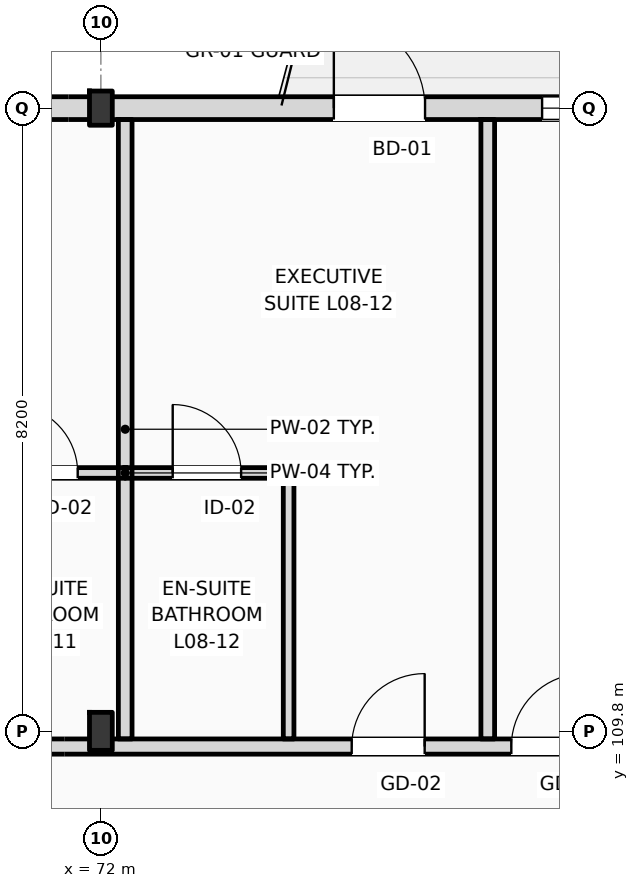
"""IFC4 building model, lengths in metres.
Left out: names, types, materials, properties, quantities, classifications, styles, units other than length and angle.
Written with IfcOpenShell. Run it as: python <this file> out.ifc"""

import sys

from ifc_helpers import new_model, si_unit, direction, frame, frame_2d, origin, origin_2d, place, context, subcontext, project, spatial, rectangle, i_section, extrude, element, fill, save


model = new_model("IFC4")
c1 = context("Model", 3, precision=1e-05, world=origin(), true_north=direction((0.0, 1.0)))
c2 = subcontext(c1, "Body", "Model", "MODEL_VIEW")
j1 = project(units=[si_unit("LENGTHUNIT", "METRE"), si_unit("PLANEANGLEUNIT", "RADIAN")], contexts=[c1])
p1 = place(None, origin())
s1 = spatial("IfcSite", under=j1, at=p1, CompositionType="ELEMENT")
p2 = place(p1, origin())
s2 = spatial("IfcBuilding", under=s1, at=p2, CompositionType="ELEMENT")
p3 = place(p2, frame((0.0, 0.0, 35.4)))
s3 = spatial("IfcBuildingStorey", under=s2, at=p3, CompositionType="ELEMENT", Elevation=35.4)
p4 = place(p3, frame((72.0, 109.8, 0.0), z_axis=(0.0, 0.0, 1.0), x_axis=(1.0, 0.0, 0.0)))
e1 = element("IfcColumn", 1, at=p4, inside=s3, PredefinedType="COLUMN", context=c2, shape_type="SweptSolid", body=[
    extrude(i_section(OverallWidth=0.3, OverallDepth=0.5, WebThickness=0.014, FlangeThickness=0.028, FilletRadius=0.027, at=origin_2d()), origin(), (0.0, 0.0, 1.0), 3.6),
])
p5 = place(p3, frame((72.0, 118.0, 0.0), z_axis=(0.0, 0.0, 1.0), x_axis=(1.0, 0.0, 0.0)))
e2 = element("IfcColumn", 2, at=p5, inside=s3, PredefinedType="COLUMN", context=c2, shape_type="SweptSolid", body=[
    extrude(i_section(OverallWidth=0.3, OverallDepth=0.45, WebThickness=0.014, FlangeThickness=0.026, FilletRadius=0.027, at=origin_2d()), origin(), (0.0, 0.0, 1.0), 3.6),
])
p6 = place(p3, frame((22.5, 118.0, 0.0), z_axis=(0.0, 0.0, 1.0), x_axis=(1.0, 0.0, 0.0)))
e3 = element("IfcWall", 3, at=p6, inside=s3, PredefinedType="STANDARD", context=c2, shape_type="SweptSolid", body=[
    extrude(rectangle(XDim=72.9, YDim=0.3, at=frame_2d((36.45, 0.0))), origin(), (0.0, 0.0, 1.0), 2.92),
])
p7 = place(p6, frame((0.91, 0.0, 0.9)))
e4 = element("IfcOpeningElement", 4, at=p7, cuts=e3, PredefinedType="OPENING", context=c2, shape_type="SweptSolid", body=[
    extrude(rectangle(XDim=0.9, YDim=1.84, at=frame_2d((0.45, 0.92))), frame((0.0, 0.16, 0.0), z_axis=(0.0, -1.0, 0.0), x_axis=(1.0, 0.0, 0.0)), (0.0, 0.0, 1.0), 0.32),
])
p8 = place(p6, frame((6.665, 0.0, 0.0)))
e5 = element("IfcOpeningElement", 5, at=p8, cuts=e3, PredefinedType="OPENING", context=c2, shape_type="SweptSolid", body=[
    extrude(rectangle(XDim=1.2, YDim=2.25, at=frame_2d((0.6, 1.125))), frame((0.0, 0.16, 0.0), z_axis=(0.0, -1.0, 0.0), x_axis=(1.0, 0.0, 0.0)), (0.0, 0.0, 1.0), 0.32),
])
p9 = place(p6, frame((11.355, 0.0, 0.9)))
e6 = element("IfcOpeningElement", 6, at=p9, cuts=e3, PredefinedType="OPENING", context=c2, shape_type="SweptSolid", body=[
    extrude(rectangle(XDim=1.1, YDim=1.5, at=frame_2d((0.55, 0.75))), frame((0.0, 0.16, 0.0), z_axis=(0.0, -1.0, 0.0), x_axis=(1.0, 0.0, 0.0)), (0.0, 0.0, 1.0), 0.32),
])
p10 = place(p6, frame((15.58, 0.0, 0.9)))
e7 = element("IfcOpeningElement", 7, at=p10, cuts=e3, PredefinedType="OPENING", context=c2, shape_type="SweptSolid", body=[
    extrude(rectangle(XDim=1.25, YDim=1.6, at=frame_2d((0.625, 0.8))), frame((0.0, 0.16, 0.0), z_axis=(0.0, -1.0, 0.0), x_axis=(1.0, 0.0, 0.0)), (0.0, 0.0, 1.0), 0.32),
])
p11 = place(p6, frame((21.08, 0.0, 0.0)))
e8 = element("IfcOpeningElement", 8, at=p11, cuts=e3, PredefinedType="OPENING", context=c2, shape_type="SweptSolid", body=[
    extrude(rectangle(XDim=1.2, YDim=2.25, at=frame_2d((0.6, 1.125))), frame((0.0, 0.16, 0.0), z_axis=(0.0, -1.0, 0.0), x_axis=(1.0, 0.0, 0.0)), (0.0, 0.0, 1.0), 0.32),
])
p12 = place(p6, frame((23.54, 0.0, 0.0)))
e9 = element("IfcOpeningElement", 9, at=p12, cuts=e3, PredefinedType="OPENING", context=c2, shape_type="SweptSolid", body=[
    extrude(rectangle(XDim=1.2, YDim=2.25, at=frame_2d((0.6, 1.125))), frame((0.0, 0.16, 0.0), z_axis=(0.0, -1.0, 0.0), x_axis=(1.0, 0.0, 0.0)), (0.0, 0.0, 1.0), 0.32),
])
p13 = place(p6, frame((28.83, 0.0, 0.9)))
e10 = element("IfcOpeningElement", 10, at=p13, cuts=e3, PredefinedType="OPENING", context=c2, shape_type="SweptSolid", body=[
    extrude(rectangle(XDim=1.75, YDim=1.84, at=frame_2d((0.875, 0.92))), frame((0.0, 0.16, 0.0), z_axis=(0.0, -1.0, 0.0), x_axis=(1.0, 0.0, 0.0)), (0.0, 0.0, 1.0), 0.32),
])
p14 = place(p6, frame((34.805, 0.0, 0.9)))
e11 = element("IfcOpeningElement", 11, at=p14, cuts=e3, PredefinedType="OPENING", context=c2, shape_type="SweptSolid", body=[
    extrude(rectangle(XDim=1.35, YDim=1.84, at=frame_2d((0.675, 0.92))), frame((0.0, 0.16, 0.0), z_axis=(0.0, -1.0, 0.0), x_axis=(1.0, 0.0, 0.0)), (0.0, 0.0, 1.0), 0.32),
])
p15 = place(p6, frame((38.105, 0.0, 0.0)))
e12 = element("IfcOpeningElement", 12, at=p15, cuts=e3, PredefinedType="OPENING", context=c2, shape_type="SweptSolid", body=[
    extrude(rectangle(XDim=1.2, YDim=2.25, at=frame_2d((0.6, 1.125))), frame((0.0, 0.16, 0.0), z_axis=(0.0, -1.0, 0.0), x_axis=(1.0, 0.0, 0.0)), (0.0, 0.0, 1.0), 0.32),
])
p16 = place(p6, frame((42.505, 0.0, 0.9)))
e13 = element("IfcOpeningElement", 13, at=p16, cuts=e3, PredefinedType="OPENING", context=c2, shape_type="SweptSolid", body=[
    extrude(rectangle(XDim=2.6, YDim=1.84, at=frame_2d((1.3, 0.92))), frame((0.0, 0.16, 0.0), z_axis=(0.0, -1.0, 0.0), x_axis=(1.0, 0.0, 0.0)), (0.0, 0.0, 1.0), 0.32),
])
p17 = place(p6, frame((46.2, 0.0, 0.9)))
e14 = element("IfcOpeningElement", 14, at=p17, cuts=e3, PredefinedType="OPENING", context=c2, shape_type="SweptSolid", body=[
    extrude(rectangle(XDim=1.8, YDim=1.84, at=frame_2d((0.9, 0.92))), frame((0.0, 0.16, 0.0), z_axis=(0.0, -1.0, 0.0), x_axis=(1.0, 0.0, 0.0)), (0.0, 0.0, 1.0), 0.32),
])
p18 = place(p6, frame((52.565, 0.0, 0.0)))
e15 = element("IfcOpeningElement", 15, at=p18, cuts=e3, PredefinedType="OPENING", context=c2, shape_type="SweptSolid", body=[
    extrude(rectangle(XDim=1.2, YDim=2.25, at=frame_2d((0.6, 1.125))), frame((0.0, 0.16, 0.0), z_axis=(0.0, -1.0, 0.0), x_axis=(1.0, 0.0, 0.0)), (0.0, 0.0, 1.0), 0.32),
])
p19 = place(p6, frame((55.305, 0.0, 0.9)))
e16 = element("IfcOpeningElement", 16, at=p19, cuts=e3, PredefinedType="OPENING", context=c2, shape_type="SweptSolid", body=[
    extrude(rectangle(XDim=1.2, YDim=1.8, at=frame_2d((0.6, 0.9))), frame((0.0, 0.16, 0.0), z_axis=(0.0, -1.0, 0.0), x_axis=(1.0, 0.0, 0.0)), (0.0, 0.0, 1.0), 0.32),
])
p20 = place(p6, frame((60.53, 0.0, 0.9)))
e17 = element("IfcOpeningElement", 17, at=p20, cuts=e3, PredefinedType="OPENING", context=c2, shape_type="SweptSolid", body=[
    extrude(rectangle(XDim=1.35, YDim=1.84, at=frame_2d((0.675, 0.92))), frame((0.0, 0.16, 0.0), z_axis=(0.0, -1.0, 0.0), x_axis=(1.0, 0.0, 0.0)), (0.0, 0.0, 1.0), 0.32),
])
p21 = place(p6, frame((65.955, 0.0, 0.9)))
e18 = element("IfcOpeningElement", 18, at=p21, cuts=e3, PredefinedType="OPENING", context=c2, shape_type="SweptSolid", body=[
    extrude(rectangle(XDim=1.35, YDim=1.84, at=frame_2d((0.675, 0.92))), frame((0.0, 0.16, 0.0), z_axis=(0.0, -1.0, 0.0), x_axis=(1.0, 0.0, 0.0)), (0.0, 0.0, 1.0), 0.32),
])
p22 = place(p6, frame((69.335, 0.0, 0.9)))
e19 = element("IfcOpeningElement", 19, at=p22, cuts=e3, PredefinedType="OPENING", context=c2, shape_type="SweptSolid", body=[
    extrude(rectangle(XDim=1.65, YDim=1.84, at=frame_2d((0.825, 0.92))), frame((0.0, 0.16, 0.0), z_axis=(0.0, -1.0, 0.0), x_axis=(1.0, 0.0, 0.0)), (0.0, 0.0, 1.0), 0.32),
])
p23 = place(p3, frame((10.65, 109.6, 0.0), z_axis=(0.0, 0.0, 1.0), x_axis=(1.0, 0.0, 0.0)))
e20 = element("IfcWall", 20, at=p23, inside=s3, PredefinedType="PARTITIONING", context=c2, shape_type="SweptSolid", body=[
    extrude(rectangle(XDim=84.61, YDim=0.2, at=frame_2d((42.305, 0.0))), origin(), (0.0, 0.0, 1.0), 2.82),
])
p24 = place(p23, frame((12.675, 0.0, 0.0)))
e21 = element("IfcOpeningElement", 21, at=p24, cuts=e20, PredefinedType="OPENING", context=c2, shape_type="SweptSolid", body=[
    extrude(rectangle(XDim=1.02, YDim=2.2, at=frame_2d((0.51, 1.1))), frame((0.0, 0.11, 0.0), z_axis=(0.0, -1.0, 0.0), x_axis=(1.0, 0.0, 0.0)), (0.0, 0.0, 1.0), 0.22),
])
p25 = place(p23, frame((19.62, 0.0, 0.0)))
e22 = element("IfcOpeningElement", 22, at=p25, cuts=e20, PredefinedType="OPENING", context=c2, shape_type="SweptSolid", body=[
    extrude(rectangle(XDim=1.02, YDim=2.2, at=frame_2d((0.51, 1.1))), frame((0.0, 0.11, 0.0), z_axis=(0.0, -1.0, 0.0), x_axis=(1.0, 0.0, 0.0)), (0.0, 0.0, 1.0), 0.22),
])
p26 = place(p23, frame((24.12, 0.0, 0.0)))
e23 = element("IfcOpeningElement", 23, at=p26, cuts=e20, PredefinedType="OPENING", context=c2, shape_type="SweptSolid", body=[
    extrude(rectangle(XDim=1.02, YDim=2.2, at=frame_2d((0.51, 1.1))), frame((0.0, 0.11, 0.0), z_axis=(0.0, -1.0, 0.0), x_axis=(1.0, 0.0, 0.0)), (0.0, 0.0, 1.0), 0.22),
])
p27 = place(p23, frame((26.47, 0.0, 0.0)))
e24 = element("IfcOpeningElement", 24, at=p27, cuts=e20, PredefinedType="OPENING", context=c2, shape_type="SweptSolid", body=[
    extrude(rectangle(XDim=1.02, YDim=2.2, at=frame_2d((0.51, 1.1))), frame((0.0, 0.11, 0.0), z_axis=(0.0, -1.0, 0.0), x_axis=(1.0, 0.0, 0.0)), (0.0, 0.0, 1.0), 0.22),
])
p28 = place(p23, frame((33.15, 0.0, 0.0)))
e25 = element("IfcOpeningElement", 25, at=p28, cuts=e20, PredefinedType="OPENING", context=c2, shape_type="SweptSolid", body=[
    extrude(rectangle(XDim=0.96, YDim=2.2, at=frame_2d((0.48, 1.1))), frame((0.0, 0.11, 0.0), z_axis=(0.0, -1.0, 0.0), x_axis=(1.0, 0.0, 0.0)), (0.0, 0.0, 1.0), 0.22),
])
p29 = place(p23, frame((35.5, 0.0, 0.0)))
e26 = element("IfcOpeningElement", 26, at=p29, cuts=e20, PredefinedType="OPENING", context=c2, shape_type="SweptSolid", body=[
    extrude(rectangle(XDim=0.96, YDim=2.2, at=frame_2d((0.48, 1.1))), frame((0.0, 0.11, 0.0), z_axis=(0.0, -1.0, 0.0), x_axis=(1.0, 0.0, 0.0)), (0.0, 0.0, 1.0), 0.22),
])
p30 = place(p23, frame((42.15, 0.0, 0.0)))
e27 = element("IfcOpeningElement", 27, at=p30, cuts=e20, PredefinedType="OPENING", context=c2, shape_type="SweptSolid", body=[
    extrude(rectangle(XDim=0.96, YDim=2.2, at=frame_2d((0.48, 1.1))), frame((0.0, 0.11, 0.0), z_axis=(0.0, -1.0, 0.0), x_axis=(1.0, 0.0, 0.0)), (0.0, 0.0, 1.0), 0.22),
])
p31 = place(p23, frame((47.15, 0.0, 0.0)))
e28 = element("IfcOpeningElement", 28, at=p31, cuts=e20, PredefinedType="OPENING", context=c2, shape_type="SweptSolid", body=[
    extrude(rectangle(XDim=0.96, YDim=2.2, at=frame_2d((0.48, 1.1))), frame((0.0, 0.11, 0.0), z_axis=(0.0, -1.0, 0.0), x_axis=(1.0, 0.0, 0.0)), (0.0, 0.0, 1.0), 0.22),
])
p32 = place(p23, frame((51.15, 0.0, 0.0)))
e29 = element("IfcOpeningElement", 29, at=p32, cuts=e20, PredefinedType="OPENING", context=c2, shape_type="SweptSolid", body=[
    extrude(rectangle(XDim=0.96, YDim=2.2, at=frame_2d((0.48, 1.1))), frame((0.0, 0.11, 0.0), z_axis=(0.0, -1.0, 0.0), x_axis=(1.0, 0.0, 0.0)), (0.0, 0.0, 1.0), 0.22),
])
p33 = place(p23, frame((55.65, 0.0, 0.0)))
e30 = element("IfcOpeningElement", 30, at=p33, cuts=e20, PredefinedType="OPENING", context=c2, shape_type="SweptSolid", body=[
    extrude(rectangle(XDim=0.96, YDim=2.2, at=frame_2d((0.48, 1.1))), frame((0.0, 0.11, 0.0), z_axis=(0.0, -1.0, 0.0), x_axis=(1.0, 0.0, 0.0)), (0.0, 0.0, 1.0), 0.22),
])
p34 = place(p23, frame((58.0, 0.0, 0.0)))
e31 = element("IfcOpeningElement", 31, at=p34, cuts=e20, PredefinedType="OPENING", context=c2, shape_type="SweptSolid", body=[
    extrude(rectangle(XDim=0.96, YDim=2.2, at=frame_2d((0.48, 1.1))), frame((0.0, 0.11, 0.0), z_axis=(0.0, -1.0, 0.0), x_axis=(1.0, 0.0, 0.0)), (0.0, 0.0, 1.0), 0.22),
])
p35 = place(p23, frame((64.65, 0.0, 0.0)))
e32 = element("IfcOpeningElement", 32, at=p35, cuts=e20, PredefinedType="OPENING", context=c2, shape_type="SweptSolid", body=[
    extrude(rectangle(XDim=0.96, YDim=2.2, at=frame_2d((0.48, 1.1))), frame((0.0, 0.11, 0.0), z_axis=(0.0, -1.0, 0.0), x_axis=(1.0, 0.0, 0.0)), (0.0, 0.0, 1.0), 0.22),
])
p36 = place(p23, frame((66.75, 0.0, 0.0)))
e33 = element("IfcOpeningElement", 33, at=p36, cuts=e20, PredefinedType="OPENING", context=c2, shape_type="SweptSolid", body=[
    extrude(rectangle(XDim=0.96, YDim=2.2, at=frame_2d((0.48, 1.1))), frame((0.0, 0.11, 0.0), z_axis=(0.0, -1.0, 0.0), x_axis=(1.0, 0.0, 0.0)), (0.0, 0.0, 1.0), 0.22),
])
p37 = place(p23, frame((73.65, 0.0, 0.0)))
e34 = element("IfcOpeningElement", 34, at=p37, cuts=e20, PredefinedType="OPENING", context=c2, shape_type="SweptSolid", body=[
    extrude(rectangle(XDim=0.96, YDim=2.2, at=frame_2d((0.48, 1.1))), frame((0.0, 0.11, 0.0), z_axis=(0.0, -1.0, 0.0), x_axis=(1.0, 0.0, 0.0)), (0.0, 0.0, 1.0), 0.22),
])
p38 = place(p23, frame((78.4, 0.0, 0.0)))
e35 = element("IfcOpeningElement", 35, at=p38, cuts=e20, PredefinedType="OPENING", context=c2, shape_type="SweptSolid", body=[
    extrude(rectangle(XDim=0.96, YDim=2.2, at=frame_2d((0.48, 1.1))), frame((0.0, 0.11, 0.0), z_axis=(0.0, -1.0, 0.0), x_axis=(1.0, 0.0, 0.0)), (0.0, 0.0, 1.0), 0.22),
])
p39 = place(p23, frame((80.455, 0.0, 0.0)))
e36 = element("IfcOpeningElement", 36, at=p39, cuts=e20, PredefinedType="OPENING", context=c2, shape_type="SweptSolid", body=[
    extrude(rectangle(XDim=0.96, YDim=2.2, at=frame_2d((0.48, 1.1))), frame((0.0, 0.11, 0.0), z_axis=(0.0, -1.0, 0.0), x_axis=(1.0, 0.0, 0.0)), (0.0, 0.0, 1.0), 0.22),
])
p40 = place(p23, frame((2.716, 0.0, 0.0)))
e37 = element("IfcOpeningElement", 37, at=p40, cuts=e20, PredefinedType="OPENING", context=c2, shape_type="SweptSolid", body=[
    extrude(rectangle(XDim=1.35, YDim=2.25, at=frame_2d((0.675, 1.125))), frame((0.0, 0.11, 0.0), z_axis=(0.0, -1.0, 0.0), x_axis=(1.0, 0.0, 0.0)), (0.0, 0.0, 1.0), 0.22),
])
p41 = place(p23, frame((6.65, 0.0, 0.0)))
e38 = element("IfcOpeningElement", 38, at=p41, cuts=e20, PredefinedType="OPENING", context=c2, shape_type="SweptSolid", body=[
    extrude(rectangle(XDim=1.35, YDim=2.25, at=frame_2d((0.675, 1.125))), frame((0.0, 0.11, 0.0), z_axis=(0.0, -1.0, 0.0), x_axis=(1.0, 0.0, 0.0)), (0.0, 0.0, 1.0), 0.22),
])
p42 = place(p23, frame((10.583, 0.0, 0.0)))
e39 = element("IfcOpeningElement", 39, at=p42, cuts=e20, PredefinedType="OPENING", context=c2, shape_type="SweptSolid", body=[
    extrude(rectangle(XDim=1.35, YDim=2.25, at=frame_2d((0.675, 1.125))), frame((0.0, 0.11, 0.0), z_axis=(0.0, -1.0, 0.0), x_axis=(1.0, 0.0, 0.0)), (0.0, 0.0, 1.0), 0.22),
])
p43 = place(p3, frame((72.32, 109.7, 0.0), z_axis=(0.0, 0.0, 1.0), x_axis=(0.0, 1.0, 0.0)))
e40 = element("IfcWall", 40, at=p43, inside=s3, PredefinedType="PARTITIONING", context=c2, shape_type="SweptSolid", body=[
    extrude(rectangle(XDim=8.15, YDim=0.18, at=frame_2d((4.075, 0.0))), origin(), (0.0, 0.0, 1.0), 3.38),
])
p44 = place(p3, frame((70.17, 113.2, 0.0), z_axis=(0.0, 0.0, 1.0), x_axis=(1.0, 0.0, 0.0)))
e41 = element("IfcWall", 41, at=p44, inside=s3, PredefinedType="PARTITIONING", context=c2, shape_type="SweptSolid", body=[
    extrude(rectangle(XDim=2.15, YDim=0.14, at=frame_2d((1.075, 0.0))), origin(), (0.0, 0.0, 1.0), 3.38),
])
p45 = place(p44, frame((0.625, 0.0, 0.0)))
e42 = element("IfcOpeningElement", 42, at=p45, cuts=e41, PredefinedType="OPENING", context=c2, shape_type="SweptSolid", body=[
    extrude(rectangle(XDim=0.9, YDim=2.1, at=frame_2d((0.45, 1.05))), frame((0.0, 0.08, 0.0), z_axis=(0.0, -1.0, 0.0), x_axis=(1.0, 0.0, 0.0)), (0.0, 0.0, 1.0), 0.16),
])
p46 = place(p3, frame((77.09, 109.7, 0.0), z_axis=(0.0, 0.0, 1.0), x_axis=(0.0, 1.0, 0.0)))
e43 = element("IfcWall", 43, at=p46, inside=s3, PredefinedType="PARTITIONING", context=c2, shape_type="SweptSolid", body=[
    extrude(rectangle(XDim=8.15, YDim=0.18, at=frame_2d((4.075, 0.0))), origin(), (0.0, 0.0, 1.0), 3.07),
])
p47 = place(p3, frame((74.47, 109.7, 0.0), z_axis=(0.0, 0.0, 1.0), x_axis=(0.0, 1.0, 0.0)))
e44 = element("IfcWall", 44, at=p47, inside=s3, PredefinedType="PARTITIONING", context=c2, shape_type="SweptSolid", body=[
    extrude(rectangle(XDim=3.5, YDim=0.14, at=frame_2d((1.75, 0.0))), origin(), (0.0, 0.0, 1.0), 3.07),
])
p48 = place(p3, frame((72.32, 113.2, 0.0), z_axis=(0.0, 0.0, 1.0), x_axis=(1.0, 0.0, 0.0)))
e45 = element("IfcWall", 45, at=p48, inside=s3, PredefinedType="PARTITIONING", context=c2, shape_type="SweptSolid", body=[
    extrude(rectangle(XDim=2.15, YDim=0.14, at=frame_2d((1.075, 0.0))), origin(), (0.0, 0.0, 1.0), 3.38),
])
p49 = place(p48, frame((0.625, 0.0, 0.0)))
e46 = element("IfcOpeningElement", 46, at=p49, cuts=e45, PredefinedType="OPENING", context=c2, shape_type="SweptSolid", body=[
    extrude(rectangle(XDim=0.9, YDim=2.1, at=frame_2d((0.45, 1.05))), frame((0.0, 0.08, 0.0), z_axis=(0.0, -1.0, 0.0), x_axis=(1.0, 0.0, 0.0)), (0.0, 0.0, 1.0), 0.16),
])
p50 = place(p18, origin())
e47 = element("IfcDoor", 47, at=p50, inside=s3, OperationType="SINGLE_SWING_LEFT", PredefinedType="DOOR", context=c2, shape_type="SweptSolid", body=[
    extrude(rectangle(XDim=1.2, YDim=2.25, at=frame_2d((0.6, 1.125))), frame((0.0, 0.025, 0.0), z_axis=(0.0, -1.0, 0.0), x_axis=(1.0, 0.0, 0.0)), (0.0, 0.0, 1.0), 0.05),
])
fill(e15, e47)
p51 = place(p19, origin())
e48 = element("IfcWindow", 48, at=p51, inside=s3, PartitioningType="DOUBLE_PANEL_VERTICAL", PredefinedType="WINDOW", context=c2, shape_type="SweptSolid", body=[
    extrude(rectangle(XDim=1.2, YDim=1.8, at=frame_2d((0.6, 0.9))), frame((0.0, 0.03, 0.0), z_axis=(0.0, -1.0, 0.0), x_axis=(1.0, 0.0, 0.0)), (0.0, 0.0, 1.0), 0.06),
])
fill(e16, e48)
p52 = place(p45, origin())
e49 = element("IfcDoor", 49, at=p52, inside=s3, OperationType="SINGLE_SWING_LEFT", PredefinedType="DOOR", context=c2, shape_type="SweptSolid", body=[
    extrude(rectangle(XDim=0.9, YDim=2.1, at=frame_2d((0.45, 1.05))), frame((0.0, 0.025, 0.0), z_axis=(0.0, -1.0, 0.0), x_axis=(1.0, 0.0, 0.0)), (0.0, 0.0, 1.0), 0.05),
])
fill(e42, e49)
p53 = place(p35, origin())
e50 = element("IfcDoor", 50, at=p53, inside=s3, OperationType="SINGLE_SWING_RIGHT", PredefinedType="DOOR", context=c2, shape_type="SweptSolid", body=[
    extrude(rectangle(XDim=0.96, YDim=2.2, at=frame_2d((0.48, 1.1))), frame((0.0, 0.025, 0.0), z_axis=(0.0, -1.0, 0.0), x_axis=(1.0, 0.0, 0.0)), (0.0, 0.0, 1.0), 0.05),
])
fill(e32, e50)
p54 = place(p49, origin())
e51 = element("IfcDoor", 51, at=p54, inside=s3, OperationType="SINGLE_SWING_LEFT", PredefinedType="DOOR", context=c2, shape_type="SweptSolid", body=[
    extrude(rectangle(XDim=0.9, YDim=2.1, at=frame_2d((0.45, 1.05))), frame((0.0, 0.025, 0.0), z_axis=(0.0, -1.0, 0.0), x_axis=(1.0, 0.0, 0.0)), (0.0, 0.0, 1.0), 0.05),
])
fill(e46, e51)
p55 = place(p36, origin())
e52 = element("IfcDoor", 52, at=p55, inside=s3, OperationType="SINGLE_SWING_RIGHT", PredefinedType="DOOR", context=c2, shape_type="SweptSolid", body=[
    extrude(rectangle(XDim=0.96, YDim=2.2, at=frame_2d((0.48, 1.1))), frame((0.0, 0.025, 0.0), z_axis=(0.0, -1.0, 0.0), x_axis=(1.0, 0.0, 0.0)), (0.0, 0.0, 1.0), 0.05),
])
fill(e33, e52)
save(model, sys.argv[1])
